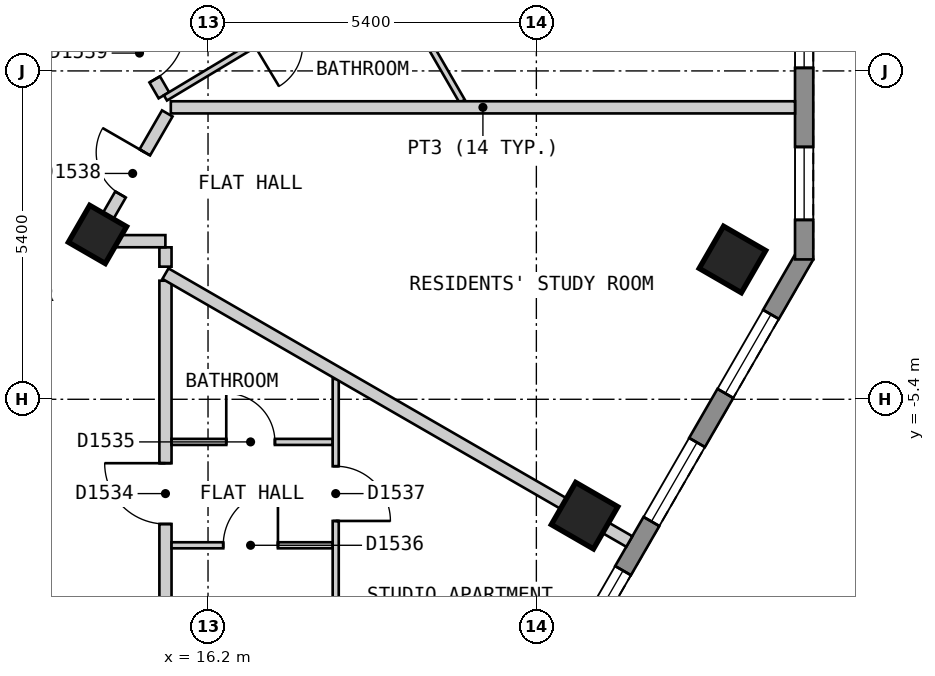
"""IFC4 building model, lengths in metres.
Left out: names, types, materials, properties, quantities, classifications, styles, units other than length and angle.
Written with IfcOpenShell. Run it as: python <this file> out.ifc"""

import sys

from ifc_helpers import new_model, si_unit, direction, frame, frame_2d, origin, origin_2d, place, context, subcontext, project, spatial, polyline, rectangle, outline, extrude, element, fill, save


model = new_model("IFC4")
c1 = context("Model", 3, precision=1e-05, world=origin(), true_north=direction((0.0, 1.0)))
c2 = subcontext(c1, "Body", "Model", "MODEL_VIEW")
j1 = project(units=[si_unit("LENGTHUNIT", "METRE"), si_unit("PLANEANGLEUNIT", "RADIAN")], contexts=[c1])
p1 = place(None, origin())
s1 = spatial("IfcSite", under=j1, at=p1, CompositionType="ELEMENT")
p2 = place(p1, origin())
s2 = spatial("IfcBuilding", under=s1, at=p2, CompositionType="ELEMENT")
p3 = place(p2, frame((0.0, 0.0, 190.2)))
s3 = spatial("IfcBuildingStorey", under=s2, at=p3, CompositionType="ELEMENT", Elevation=190.2)
for number, where, z_axis, x_axis in (
    (1, (22.393, -7.314, 0.0), (0.0, 0.0, 1.0), (0.5, 0.866, 0.0)),
    (2, (24.825, -3.101, 0.0), (0.0, 0.0, 1.0), (0.5, 0.866, 0.0)),
):
    element("IfcColumn", number, at=place(p3, frame(where, z_axis=z_axis, x_axis=x_axis)), inside=s3, PredefinedType="COLUMN", context=c2, shape_type="SweptSolid", body=[
        extrude(rectangle(XDim=0.8, YDim=0.8, at=origin_2d()), origin(), (0.0, 0.0, 1.0), 3.0),
    ])
p4 = place(p3, frame((14.382, -2.689, 0.0), z_axis=(0.0, 0.0, 1.0), x_axis=(0.5, 0.866025403784, 0.0)))
e3 = element("IfcColumn", 3, at=p4, inside=s3, PredefinedType="COLUMN", context=c2, shape_type="SweptSolid", body=[
    extrude(rectangle(XDim=0.7, YDim=0.7, at=origin_2d()), origin(), (0.0, 0.0, 1.0), 3.0),
])
p5 = place(p3, frame((15.631, -21.025, 0.0), z_axis=(0.0, 0.0, 1.0), x_axis=(0.500018670445, 0.86601462413, 0.0)))
e4 = element("IfcWall", 4, at=p5, inside=s3, PredefinedType="SOLIDWALL", context=c2, shape_type="SweptSolid", body=[
    extrude(outline(polyline([(0.0, -0.15), (20.785, -0.15), (20.705, 0.15), (0.08, 0.15), (0.0, -0.15)])), origin(), (0.0, 0.0, 1.0), 2.7),
])
p6 = place(p5, frame((1.13, 0.0, 0.15)))
e5 = element("IfcOpeningElement", 5, at=p6, cuts=e4, PredefinedType="OPENING", context=c2, shape_type="SweptSolid", body=[
    extrude(rectangle(XDim=1.5, YDim=2.1, at=frame_2d((0.75, 1.05))), frame((0.0, 0.16, 0.0), z_axis=(0.0, -1.0, 0.0), x_axis=(1.0, 0.0, 0.0)), (0.0, 0.0, 1.0), 0.32),
])
p7 = place(p5, frame((3.562, 0.0, 0.15)))
e6 = element("IfcOpeningElement", 6, at=p7, cuts=e4, PredefinedType="OPENING", context=c2, shape_type="SweptSolid", body=[
    extrude(rectangle(XDim=1.5, YDim=2.1, at=frame_2d((0.75, 1.05))), frame((0.0, 0.16, 0.0), z_axis=(0.0, -1.0, 0.0), x_axis=(1.0, 0.0, 0.0)), (0.0, 0.0, 1.0), 0.32),
])
p8 = place(p5, frame((5.994, 0.0, 0.15)))
e7 = element("IfcOpeningElement", 7, at=p8, cuts=e4, PredefinedType="OPENING", context=c2, shape_type="SweptSolid", body=[
    extrude(rectangle(XDim=1.5, YDim=2.1, at=frame_2d((0.75, 1.05))), frame((0.0, 0.16, 0.0), z_axis=(0.0, -1.0, 0.0), x_axis=(1.0, 0.0, 0.0)), (0.0, 0.0, 1.0), 0.32),
])
p9 = place(p5, frame((8.425, 0.0, 0.15)))
e8 = element("IfcOpeningElement", 8, at=p9, cuts=e4, PredefinedType="OPENING", context=c2, shape_type="SweptSolid", body=[
    extrude(rectangle(XDim=1.5, YDim=2.1, at=frame_2d((0.75, 1.05))), frame((0.0, 0.16, 0.0), z_axis=(0.0, -1.0, 0.0), x_axis=(1.0, 0.0, 0.0)), (0.0, 0.0, 1.0), 0.32),
])
p10 = place(p5, frame((10.857, 0.0, 0.15)))
e9 = element("IfcOpeningElement", 9, at=p10, cuts=e4, PredefinedType="OPENING", context=c2, shape_type="SweptSolid", body=[
    extrude(rectangle(XDim=1.5, YDim=2.1, at=frame_2d((0.75, 1.05))), frame((0.0, 0.16, 0.0), z_axis=(0.0, -1.0, 0.0), x_axis=(1.0, 0.0, 0.0)), (0.0, 0.0, 1.0), 0.32),
])
p11 = place(p5, frame((13.289, 0.0, 0.15)))
e10 = element("IfcOpeningElement", 10, at=p11, cuts=e4, PredefinedType="OPENING", context=c2, shape_type="SweptSolid", body=[
    extrude(rectangle(XDim=1.5, YDim=2.1, at=frame_2d((0.75, 1.05))), frame((0.0, 0.16, 0.0), z_axis=(0.0, -1.0, 0.0), x_axis=(1.0, 0.0, 0.0)), (0.0, 0.0, 1.0), 0.32),
])
p12 = place(p5, frame((15.722, 0.0, 0.15)))
e11 = element("IfcOpeningElement", 11, at=p12, cuts=e4, PredefinedType="OPENING", context=c2, shape_type="SweptSolid", body=[
    extrude(rectangle(XDim=1.5, YDim=2.1, at=frame_2d((0.75, 1.05))), frame((0.0, 0.16, 0.0), z_axis=(0.0, -1.0, 0.0), x_axis=(1.0, 0.0, 0.0)), (0.0, 0.0, 1.0), 0.32),
])
p13 = place(p5, frame((18.154, 0.0, 0.15)))
e12 = element("IfcOpeningElement", 12, at=p13, cuts=e4, PredefinedType="OPENING", context=c2, shape_type="SweptSolid", body=[
    extrude(rectangle(XDim=1.5, YDim=2.1, at=frame_2d((0.75, 1.05))), frame((0.0, 0.16, 0.0), z_axis=(0.0, -1.0, 0.0), x_axis=(1.0, 0.0, 0.0)), (0.0, 0.0, 1.0), 0.32),
])
p14 = place(p3, frame((26.004, -3.1, 0.0), z_axis=(0.0, 0.0, 1.0), x_axis=(0.0, 1.0, 0.0)))
e13 = element("IfcWall", 13, at=p14, inside=s3, PredefinedType="SOLIDWALL", context=c2, shape_type="SweptSolid", body=[
    extrude(outline(polyline([(0.0, -0.15), (5.0, -0.15), (4.92, 0.15), (0.08, 0.15), (0.0, -0.15)])), origin(), (0.0, 0.0, 1.0), 2.7),
])
p15 = place(p14, frame((0.65, 0.0, 0.15)))
e14 = element("IfcOpeningElement", 14, at=p15, cuts=e13, PredefinedType="OPENING", context=c2, shape_type="SweptSolid", body=[
    extrude(rectangle(XDim=1.2, YDim=2.1, at=frame_2d((0.6, 1.05))), frame((0.0, 0.16, 0.0), z_axis=(0.0, -1.0, 0.0), x_axis=(1.0, 0.0, 0.0)), (0.0, 0.0, 1.0), 0.32),
])
p16 = place(p14, frame((3.15, 0.0, 0.15)))
e15 = element("IfcOpeningElement", 15, at=p16, cuts=e13, PredefinedType="OPENING", context=c2, shape_type="SweptSolid", body=[
    extrude(rectangle(XDim=1.2, YDim=2.1, at=frame_2d((0.6, 1.05))), frame((0.0, 0.16, 0.0), z_axis=(0.0, -1.0, 0.0), x_axis=(1.0, 0.0, 0.0)), (0.0, 0.0, 1.0), 0.32),
])
p17 = place(p3, frame((10.739, 7.8, 0.0), z_axis=(0.0, 0.0, 1.0), x_axis=(0.500023726918, -0.866011704609, 0.0)))
e16 = element("IfcWall", 16, at=p17, inside=s3, PredefinedType="PARTITIONING", context=c2, shape_type="SweptSolid", body=[
    extrude(rectangle(XDim=9.47, YDim=0.2, at=frame_2d((4.735, 0.0))), origin(), (0.0, 0.0, 1.0), 2.7),
])
p18 = place(p17, frame((8.168, 0.0, 0.0)))
e17 = element("IfcOpeningElement", 17, at=p18, cuts=e16, PredefinedType="OPENING", context=c2, shape_type="SweptSolid", body=[
    extrude(rectangle(XDim=1.0, YDim=2.1, at=frame_2d((0.5, 1.05))), frame((0.0, 0.11, 0.0), z_axis=(0.0, -1.0, 0.0), x_axis=(1.0, 0.0, 0.0)), (0.0, 0.0, 1.0), 0.22),
])
p19 = place(p17, frame((3.578, 0.0, 0.0)))
e18 = element("IfcOpeningElement", 18, at=p19, cuts=e16, PredefinedType="OPENING", context=c2, shape_type="SweptSolid", body=[
    extrude(rectangle(XDim=1.0, YDim=2.1, at=frame_2d((0.5, 1.05))), frame((0.0, 0.11, 0.0), z_axis=(0.0, -1.0, 0.0), x_axis=(1.0, 0.0, 0.0)), (0.0, 0.0, 1.0), 0.22),
])
p20 = place(p3, frame((15.5, -2.901, 0.0), z_axis=(0.0, 0.0, 1.0), x_axis=(0.0, -1.0, 0.0)))
e19 = element("IfcWall", 19, at=p20, inside=s3, PredefinedType="PARTITIONING", context=c2, shape_type="SweptSolid", body=[
    extrude(rectangle(XDim=0.318, YDim=0.2, at=frame_2d((0.159, 0.0))), origin(), (0.0, 0.0, 1.0), 2.7),
])
p21 = place(p3, frame((14.433, -2.8, 0.0), z_axis=(0.0, 0.0, 1.0), x_axis=(1.0, 0.0, 0.0)))
e20 = element("IfcWall", 20, at=p21, inside=s3, PredefinedType="PARTITIONING", context=c2, shape_type="SweptSolid", body=[
    extrude(rectangle(XDim=1.066, YDim=0.2, at=frame_2d((0.533, 0.0))), origin(), (0.0, 0.0, 1.0), 2.7),
])
p22 = place(p3, frame((14.318, -2.8, 0.0), z_axis=(0.0, 0.0, 1.0), x_axis=(0.49964693309, 0.866229151122, 0.0)))
e21 = element("IfcWall", 21, at=p22, inside=s3, PredefinedType="PARTITIONING", context=c2, shape_type="SweptSolid", body=[
    extrude(rectangle(XDim=2.426, YDim=0.2, at=frame_2d((1.213, 0.0))), origin(), (0.0, 0.0, 1.0), 2.7),
])
p23 = place(p22, frame((0.886, 0.0, 0.0)))
e22 = element("IfcOpeningElement", 22, at=p23, cuts=e21, PredefinedType="OPENING", context=c2, shape_type="SweptSolid", body=[
    extrude(rectangle(XDim=0.8, YDim=2.1, at=frame_2d((0.4, 1.05))), frame((0.0, 0.11, 0.0), z_axis=(0.0, -1.0, 0.0), x_axis=(1.0, 0.0, 0.0)), (0.0, 0.0, 1.0), 0.22),
])
p24 = place(p3, frame((15.5, -18.799, 0.0), z_axis=(0.0, 0.0, 1.0), x_axis=(0.0, 1.0, 0.0)))
e23 = element("IfcWall", 23, at=p24, inside=s3, PredefinedType="PARTITIONING", context=c2, shape_type="SweptSolid", body=[
    extrude(rectangle(XDim=15.349, YDim=0.2, at=frame_2d((7.675, 0.0))), origin(), (0.0, 0.0, 1.0), 2.7),
])
p25 = place(p24, frame((4.477, 0.0, 0.0)))
e24 = element("IfcOpeningElement", 24, at=p25, cuts=e23, PredefinedType="OPENING", context=c2, shape_type="SweptSolid", body=[
    extrude(rectangle(XDim=0.8, YDim=2.1, at=frame_2d((0.4, 1.05))), frame((0.0, 0.11, 0.0), z_axis=(0.0, -1.0, 0.0), x_axis=(1.0, 0.0, 0.0)), (0.0, 0.0, 1.0), 0.22),
])
p26 = place(p24, frame((11.348, 0.0, 0.0)))
e25 = element("IfcOpeningElement", 25, at=p26, cuts=e23, PredefinedType="OPENING", context=c2, shape_type="SweptSolid", body=[
    extrude(rectangle(XDim=1.0, YDim=2.1, at=frame_2d((0.5, 1.05))), frame((0.0, 0.11, 0.0), z_axis=(0.0, -1.0, 0.0), x_axis=(1.0, 0.0, 0.0)), (0.0, 0.0, 1.0), 0.22),
])
p27 = place(p3, frame((19.75, 0.592, 0.0), z_axis=(0.0, 0.0, 1.0), x_axis=(0.499974077718, -0.866040369504, 0.0)))
e26 = element("IfcWall", 26, at=p27, inside=s3, PredefinedType="PARTITIONING", context=c2, shape_type="SweptSolid", body=[
    extrude(rectangle(XDim=1.26, YDim=0.1, at=frame_2d((0.63, 0.0))), origin(), (0.0, 0.0, 1.0), 2.7),
])
p28 = place(p3, frame((15.6, -6.101, 0.0), z_axis=(0.0, 0.0, 1.0), x_axis=(1.0, 0.0, 0.0)))
e27 = element("IfcWall", 27, at=p28, inside=s3, PredefinedType="PARTITIONING", context=c2, shape_type="SweptSolid", body=[
    extrude(rectangle(XDim=2.65, YDim=0.1, at=frame_2d((1.325, 0.0))), origin(), (0.0, 0.0, 1.0), 2.7),
])
p29 = place(p28, frame((0.9, 0.0, 0.0)))
e28 = element("IfcOpeningElement", 28, at=p29, cuts=e27, PredefinedType="OPENING", context=c2, shape_type="SweptSolid", body=[
    extrude(rectangle(XDim=0.8, YDim=2.1, at=frame_2d((0.4, 1.05))), frame((0.0, 0.06, 0.0), z_axis=(0.0, -1.0, 0.0), x_axis=(1.0, 0.0, 0.0)), (0.0, 0.0, 1.0), 0.12),
])
p30 = place(p3, frame((15.6, -7.801, 0.0), z_axis=(0.0, 0.0, 1.0), x_axis=(1.0, 0.0, 0.0)))
e29 = element("IfcWall", 29, at=p30, inside=s3, PredefinedType="PARTITIONING", context=c2, shape_type="SweptSolid", body=[
    extrude(rectangle(XDim=2.65, YDim=0.1, at=frame_2d((1.325, 0.0))), origin(), (0.0, 0.0, 1.0), 2.7),
])
p31 = place(p30, frame((0.85, 0.0, 0.0)))
e30 = element("IfcOpeningElement", 30, at=p31, cuts=e29, PredefinedType="OPENING", context=c2, shape_type="SweptSolid", body=[
    extrude(rectangle(XDim=0.9, YDim=2.1, at=frame_2d((0.45, 1.05))), frame((0.0, 0.06, 0.0), z_axis=(0.0, -1.0, 0.0), x_axis=(1.0, 0.0, 0.0)), (0.0, 0.0, 1.0), 0.12),
])
p32 = place(p3, frame((18.3, -10.452, 0.0), z_axis=(0.0, 0.0, 1.0), x_axis=(0.0, 1.0, 0.0)))
e31 = element("IfcWall", 31, at=p32, inside=s3, PredefinedType="PARTITIONING", context=c2, shape_type="SweptSolid", body=[
    extrude(rectangle(XDim=5.386, YDim=0.1, at=frame_2d((2.693, 0.0))), origin(), (0.0, 0.0, 1.0), 2.7),
])
p33 = place(p32, frame((3.051, 0.0, 0.0)))
e32 = element("IfcOpeningElement", 32, at=p33, cuts=e31, PredefinedType="OPENING", context=c2, shape_type="SweptSolid", body=[
    extrude(rectangle(XDim=0.9, YDim=2.1, at=frame_2d((0.45, 1.05))), frame((0.0, 0.06, 0.0), z_axis=(0.0, -1.0, 0.0), x_axis=(1.0, 0.0, 0.0)), (0.0, 0.0, 1.0), 0.12),
])
p34 = place(p3, frame((15.499, -0.444, 0.0), z_axis=(0.0, 0.0, 1.0), x_axis=(0.857061798163, 0.515213619899, 0.0)))
e33 = element("IfcWall", 33, at=p34, inside=s3, PredefinedType="PARTITIONING", context=c2, shape_type="SweptSolid", body=[
    extrude(rectangle(XDim=4.15, YDim=0.1, at=frame_2d((2.075, 0.0))), origin(), (0.0, 0.0, 1.0), 2.7),
])
p35 = place(p34, frame((1.7, 0.0, 0.0)))
e34 = element("IfcOpeningElement", 34, at=p35, cuts=e33, PredefinedType="OPENING", context=c2, shape_type="SweptSolid", body=[
    extrude(rectangle(XDim=0.8, YDim=2.1, at=frame_2d((0.4, 1.05))), frame((0.0, 0.06, 0.0), z_axis=(0.0, -1.0, 0.0), x_axis=(1.0, 0.0, 0.0)), (0.0, 0.0, 1.0), 0.12),
])
p36 = place(p3, frame((15.5, -3.334, 0.0), z_axis=(0.0, 0.0, 1.0), x_axis=(0.866001896501, -0.5000407136, 0.0)))
e35 = element("IfcWall", 35, at=p36, inside=s3, PredefinedType="PARTITIONING", context=c2, shape_type="SweptSolid", body=[
    extrude(rectangle(XDim=8.809, YDim=0.2, at=frame_2d((4.405, 0.0))), origin(), (0.0, 0.0, 1.0), 2.7),
])
p37 = place(p3, frame((15.588, -0.599, 0.0), z_axis=(0.0, 0.0, 1.0), x_axis=(1.0, 0.0, 0.0)))
e36 = element("IfcWall", 36, at=p37, inside=s3, PredefinedType="PARTITIONING", context=c2, shape_type="SweptSolid", body=[
    extrude(rectangle(XDim=10.266, YDim=0.2, at=frame_2d((5.133, 0.0))), origin(), (0.0, 0.0, 1.0), 2.7),
])
p38 = place(p11, origin())
e37 = element("IfcWindow", 37, at=p38, inside=s3, PartitioningType="SINGLE_PANEL", PredefinedType="WINDOW", context=c2, shape_type="SweptSolid", body=[
    extrude(rectangle(XDim=1.5, YDim=2.1, at=frame_2d((0.75, 1.05))), frame((0.0, 0.03, 0.0), z_axis=(0.0, -1.0, 0.0), x_axis=(1.0, 0.0, 0.0)), (0.0, 0.0, 1.0), 0.06),
])
fill(e10, e37)
p39 = place(p12, origin())
e38 = element("IfcWindow", 38, at=p39, inside=s3, PartitioningType="SINGLE_PANEL", PredefinedType="WINDOW", context=c2, shape_type="SweptSolid", body=[
    extrude(rectangle(XDim=1.5, YDim=2.1, at=frame_2d((0.75, 1.05))), frame((0.0, 0.03, 0.0), z_axis=(0.0, -1.0, 0.0), x_axis=(1.0, 0.0, 0.0)), (0.0, 0.0, 1.0), 0.06),
])
fill(e11, e38)
p40 = place(p13, origin())
e39 = element("IfcWindow", 39, at=p40, inside=s3, PartitioningType="SINGLE_PANEL", PredefinedType="WINDOW", context=c2, shape_type="SweptSolid", body=[
    extrude(rectangle(XDim=1.5, YDim=2.1, at=frame_2d((0.75, 1.05))), frame((0.0, 0.03, 0.0), z_axis=(0.0, -1.0, 0.0), x_axis=(1.0, 0.0, 0.0)), (0.0, 0.0, 1.0), 0.06),
])
fill(e12, e39)
p41 = place(p15, origin())
e40 = element("IfcWindow", 40, at=p41, inside=s3, PartitioningType="SINGLE_PANEL", PredefinedType="WINDOW", context=c2, shape_type="SweptSolid", body=[
    extrude(rectangle(XDim=1.2, YDim=2.1, at=frame_2d((0.6, 1.05))), frame((0.0, 0.03, 0.0), z_axis=(0.0, -1.0, 0.0), x_axis=(1.0, 0.0, 0.0)), (0.0, 0.0, 1.0), 0.06),
])
fill(e14, e40)
p42 = place(p16, origin())
e41 = element("IfcWindow", 41, at=p42, inside=s3, PartitioningType="SINGLE_PANEL", PredefinedType="WINDOW", context=c2, shape_type="SweptSolid", body=[
    extrude(rectangle(XDim=1.2, YDim=2.1, at=frame_2d((0.6, 1.05))), frame((0.0, 0.03, 0.0), z_axis=(0.0, -1.0, 0.0), x_axis=(1.0, 0.0, 0.0)), (0.0, 0.0, 1.0), 0.06),
])
fill(e15, e41)
p43 = place(p26, origin())
e42 = element("IfcDoor", 42, at=p43, inside=s3, OperationType="SINGLE_SWING_RIGHT", PredefinedType="DOOR", context=c2, shape_type="SweptSolid", body=[
    extrude(rectangle(XDim=1.0, YDim=2.1, at=frame_2d((0.5, 1.05))), frame((0.0, 0.025, 0.0), z_axis=(0.0, -1.0, 0.0), x_axis=(1.0, 0.0, 0.0)), (0.0, 0.0, 1.0), 0.05),
])
fill(e25, e42)
p44 = place(p29, origin())
e43 = element("IfcDoor", 43, at=p44, inside=s3, OperationType="SINGLE_SWING_LEFT", PredefinedType="DOOR", context=c2, shape_type="SweptSolid", body=[
    extrude(rectangle(XDim=0.8, YDim=2.1, at=frame_2d((0.4, 1.05))), frame((0.0, 0.025, 0.0), z_axis=(0.0, -1.0, 0.0), x_axis=(1.0, 0.0, 0.0)), (0.0, 0.0, 1.0), 0.05),
])
fill(e28, e43)
p45 = place(p31, origin())
e44 = element("IfcDoor", 44, at=p45, inside=s3, OperationType="SINGLE_SWING_RIGHT", PredefinedType="DOOR", context=c2, shape_type="SweptSolid", body=[
    extrude(rectangle(XDim=0.9, YDim=2.1, at=frame_2d((0.45, 1.05))), frame((0.0, 0.025, 0.0), z_axis=(0.0, -1.0, 0.0), x_axis=(1.0, 0.0, 0.0)), (0.0, 0.0, 1.0), 0.05),
])
fill(e30, e44)
p46 = place(p33, origin())
e45 = element("IfcDoor", 45, at=p46, inside=s3, OperationType="SINGLE_SWING_LEFT", PredefinedType="DOOR", context=c2, shape_type="SweptSolid", body=[
    extrude(rectangle(XDim=0.9, YDim=2.1, at=frame_2d((0.45, 1.05))), frame((0.0, 0.025, 0.0), z_axis=(0.0, -1.0, 0.0), x_axis=(1.0, 0.0, 0.0)), (0.0, 0.0, 1.0), 0.05),
])
fill(e32, e45)
p47 = place(p23, origin())
e46 = element("IfcDoor", 46, at=p47, inside=s3, OperationType="SINGLE_SWING_RIGHT", PredefinedType="DOOR", context=c2, shape_type="SweptSolid", body=[
    extrude(rectangle(XDim=0.8, YDim=2.1, at=frame_2d((0.4, 1.05))), frame((0.0, 0.025, 0.0), z_axis=(0.0, -1.0, 0.0), x_axis=(1.0, 0.0, 0.0)), (0.0, 0.0, 1.0), 0.05),
])
fill(e22, e46)
p48 = place(p18, origin())
e47 = element("IfcDoor", 47, at=p48, inside=s3, OperationType="SINGLE_SWING_LEFT", PredefinedType="DOOR", context=c2, shape_type="SweptSolid", body=[
    extrude(rectangle(XDim=1.0, YDim=2.1, at=frame_2d((0.5, 1.05))), frame((0.0, 0.025, 0.0), z_axis=(0.0, -1.0, 0.0), x_axis=(1.0, 0.0, 0.0)), (0.0, 0.0, 1.0), 0.05),
])
fill(e17, e47)
save(model, sys.argv[1])
